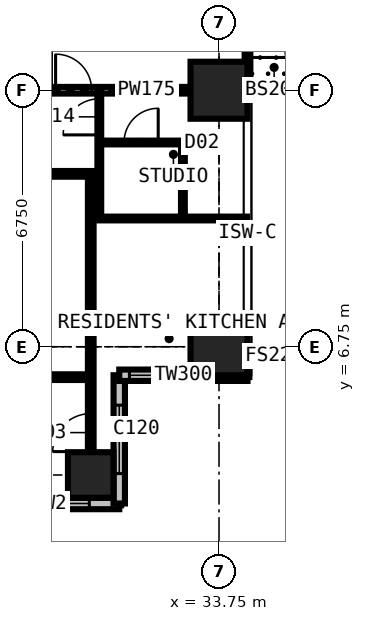
"""IFC4 building model, lengths in metres.
Left out: names, types, materials, properties, quantities, classifications, styles, units other than length and angle.
Written with IfcOpenShell. Run it as: python <this file> out.ifc"""

import sys

from ifc_helpers import new_model, si_unit, direction, frame, frame_2d, origin, origin_2d, place, context, subcontext, project, spatial, rectangle, extrude, element, fill, save


model = new_model("IFC4")
c1 = context("Model", 3, precision=1e-05, world=origin(), true_north=direction((0.0, 1.0)))
c2 = subcontext(c1, "Body", "Model", "MODEL_VIEW")
j1 = project(units=[si_unit("LENGTHUNIT", "METRE"), si_unit("PLANEANGLEUNIT", "RADIAN")], contexts=[c1])
p1 = place(None, origin())
s1 = spatial("IfcSite", under=j1, at=p1, CompositionType="ELEMENT")
p2 = place(p1, origin())
s2 = spatial("IfcBuilding", under=s1, at=p2, CompositionType="ELEMENT")
p3 = place(p2, frame((0.0, 0.0, 156.6)))
s3 = spatial("IfcBuildingStorey", under=s2, at=p3, CompositionType="ELEMENT", Elevation=156.6)
p4 = place(p3, frame((30.375, 3.375, 0.0), z_axis=(0.0, 0.0, 1.0), x_axis=(1.0, 0.0, 0.0)))
e1 = element("IfcColumn", 1, at=p4, inside=s3, PredefinedType="COLUMN", context=c2, shape_type="SweptSolid", body=[
    extrude(rectangle(XDim=1.2, YDim=1.2, at=origin_2d()), origin(), (0.0, 0.0, 1.0), 3.6),
])
for number, where, z_axis, x_axis in (
    (2, (33.75, 6.75, 0.0), (0.0, 0.0, 1.0), (1.0, 0.0, 0.0)),
    (3, (33.75, 13.5, 0.0), (0.0, 0.0, 1.0), (1.0, 0.0, 0.0)),
):
    element("IfcColumn", number, at=place(p3, frame(where, z_axis=z_axis, x_axis=x_axis)), inside=s3, PredefinedType="COLUMN", context=c2, shape_type="SweptSolid", body=[
        extrude(rectangle(XDim=1.5, YDim=1.5, at=origin_2d()), origin(), (0.0, 0.0, 1.0), 3.6),
    ])
p5 = place(p3, frame((34.5, 20.25, 0.0), z_axis=(0.0, 0.0, 1.0), x_axis=(0.0, -1.0, 0.0)))
e4 = element("IfcWall", 4, at=p5, inside=s3, PredefinedType="SOLIDWALL", context=c2, shape_type="SweptSolid", body=[
    extrude(rectangle(XDim=6.75, YDim=0.15, at=frame_2d((3.375, 0.0))), origin(), (0.0, 0.0, 1.0), 3.375),
])
p6 = place(p5, frame((0.863, 0.0, 0.0)))
e5 = element("IfcOpeningElement", 5, at=p6, cuts=e4, PredefinedType="OPENING", context=c2, shape_type="SweptSolid", body=[
    extrude(rectangle(XDim=1.0, YDim=2.2, at=frame_2d((0.5, 1.1))), frame((0.0, 0.085, 0.0), z_axis=(0.0, -1.0, 0.0), x_axis=(1.0, 0.0, 0.0)), (0.0, 0.0, 1.0), 0.17),
])
p7 = place(p5, frame((1.975, 0.0, 0.9)))
e6 = element("IfcOpeningElement", 6, at=p7, cuts=e4, PredefinedType="OPENING", context=c2, shape_type="SweptSolid", body=[
    extrude(rectangle(XDim=1.2, YDim=1.8, at=frame_2d((0.6, 0.9))), frame((0.0, 0.085, 0.0), z_axis=(0.0, -1.0, 0.0), x_axis=(1.0, 0.0, 0.0)), (0.0, 0.0, 1.0), 0.17),
])
p8 = place(p5, frame((4.887, 0.0, 0.0)))
e7 = element("IfcOpeningElement", 7, at=p8, cuts=e4, PredefinedType="OPENING", context=c2, shape_type="SweptSolid", body=[
    extrude(rectangle(XDim=1.0, YDim=2.2, at=frame_2d((0.5, 1.1))), frame((0.0, 0.085, 0.0), z_axis=(0.0, -1.0, 0.0), x_axis=(1.0, 0.0, 0.0)), (0.0, 0.0, 1.0), 0.17),
])
p9 = place(p5, frame((3.575, 0.0, 0.9)))
e8 = element("IfcOpeningElement", 8, at=p9, cuts=e4, PredefinedType="OPENING", context=c2, shape_type="SweptSolid", body=[
    extrude(rectangle(XDim=1.2, YDim=1.8, at=frame_2d((0.6, 0.9))), frame((0.0, 0.085, 0.0), z_axis=(0.0, -1.0, 0.0), x_axis=(1.0, 0.0, 0.0)), (0.0, 0.0, 1.0), 0.17),
])
p10 = place(p3, frame((27.75, 2.625, 0.0), z_axis=(0.0, 0.0, 1.0), x_axis=(1.0, 0.0, 0.0)))
e9 = element("IfcWall", 9, at=p10, inside=s3, PredefinedType="SOLIDWALL", context=c2, shape_type="SweptSolid", body=[
    extrude(rectangle(XDim=3.375, YDim=0.3, at=frame_2d((1.688, 0.0))), origin(), (0.0, 0.0, 1.0), 3.375),
])
p11 = place(p10, frame((0.788, 0.0, 0.6)))
e10 = element("IfcOpeningElement", 10, at=p11, cuts=e9, PredefinedType="OPENING", context=c2, shape_type="SweptSolid", body=[
    extrude(rectangle(XDim=1.8, YDim=2.1, at=frame_2d((0.9, 1.05))), frame((0.0, 0.16, 0.0), z_axis=(0.0, -1.0, 0.0), x_axis=(1.0, 0.0, 0.0)), (0.0, 0.0, 1.0), 0.32),
])
p12 = place(p3, frame((31.125, 2.625, 0.0), z_axis=(0.0, 0.0, 1.0), x_axis=(0.0, 1.0, 0.0)))
e11 = element("IfcWall", 11, at=p12, inside=s3, PredefinedType="SOLIDWALL", context=c2, shape_type="SweptSolid", body=[
    extrude(rectangle(XDim=3.375, YDim=0.3, at=frame_2d((1.688, 0.0))), origin(), (0.0, 0.0, 1.0), 3.375),
])
p13 = place(p12, frame((0.788, 0.0, 0.6)))
e12 = element("IfcOpeningElement", 12, at=p13, cuts=e11, PredefinedType="OPENING", context=c2, shape_type="SweptSolid", body=[
    extrude(rectangle(XDim=1.8, YDim=2.1, at=frame_2d((0.9, 1.05))), frame((0.0, 0.16, 0.0), z_axis=(0.0, -1.0, 0.0), x_axis=(1.0, 0.0, 0.0)), (0.0, 0.0, 1.0), 0.32),
])
p14 = place(p3, frame((31.125, 6.0, 0.0), z_axis=(0.0, 0.0, 1.0), x_axis=(1.0, 0.0, 0.0)))
e13 = element("IfcWall", 13, at=p14, inside=s3, PredefinedType="SOLIDWALL", context=c2, shape_type="SweptSolid", body=[
    extrude(rectangle(XDim=3.375, YDim=0.3, at=frame_2d((1.688, 0.0))), origin(), (0.0, 0.0, 1.0), 3.375),
])
p15 = place(p14, frame((0.268, 0.0, 0.9)))
e14 = element("IfcOpeningElement", 14, at=p15, cuts=e13, PredefinedType="OPENING", context=c2, shape_type="SweptSolid", body=[
    extrude(rectangle(XDim=1.5, YDim=1.8, at=frame_2d((0.75, 0.9))), frame((0.0, 0.16, 0.0), z_axis=(0.0, -1.0, 0.0), x_axis=(1.0, 0.0, 0.0)), (0.0, 0.0, 1.0), 0.32),
])
p16 = place(p3, frame((10.125, 11.3, 0.0), z_axis=(0.0, 0.0, 1.0), x_axis=(1.0, 0.0, 0.0)))
e15 = element("IfcWall", 15, at=p16, inside=s3, PredefinedType="PARTITIONING", context=c2, shape_type="SweptSolid", body=[
    extrude(rectangle(XDim=20.475, YDim=0.15, at=frame_2d((10.238, 0.0))), origin(), (0.0, 0.0, 1.0), 3.375),
])
p17 = place(p16, frame((11.312, 0.0, 0.0)))
e16 = element("IfcOpeningElement", 16, at=p17, cuts=e15, PredefinedType="OPENING", context=c2, shape_type="SweptSolid", body=[
    extrude(rectangle(XDim=1.0, YDim=2.2, at=frame_2d((0.5, 1.1))), frame((0.0, 0.085, 0.0), z_axis=(0.0, -1.0, 0.0), x_axis=(1.0, 0.0, 0.0)), (0.0, 0.0, 1.0), 0.17),
])
p18 = place(p3, frame((27.725, 5.95, 0.0), z_axis=(0.0, 0.0, 1.0), x_axis=(1.0, 0.0, 0.0)))
e17 = element("IfcWall", 17, at=p18, inside=s3, PredefinedType="PARTITIONING", context=c2, shape_type="SweptSolid", body=[
    extrude(rectangle(XDim=2.65, YDim=0.15, at=frame_2d((1.325, 0.0))), origin(), (0.0, 0.0, 1.0), 3.375),
])
p19 = place(p3, frame((29.2, 13.5, 0.0), z_axis=(0.0, 0.0, 1.0), x_axis=(1.0, 0.0, 0.0)))
e18 = element("IfcWall", 18, at=p19, inside=s3, PredefinedType="PARTITIONING", context=c2, shape_type="SweptSolid", body=[
    extrude(rectangle(XDim=5.284, YDim=0.175, at=frame_2d((2.642, 0.0))), origin(), (0.0, 0.0, 1.0), 2.806),
])
p20 = place(p19, frame((0.25, 0.0, 0.0)))
e19 = element("IfcOpeningElement", 19, at=p20, cuts=e18, PredefinedType="OPENING", context=c2, shape_type="SweptSolid", body=[
    extrude(rectangle(XDim=0.95, YDim=2.2, at=frame_2d((0.475, 1.1))), frame((0.0, 0.097, 0.0), z_axis=(0.0, -1.0, 0.0), x_axis=(1.0, 0.0, 0.0)), (0.0, 0.0, 1.0), 0.195),
])
p21 = place(p3, frame((30.375, 2.775, 0.0), z_axis=(0.0, 0.0, 1.0), x_axis=(0.0, 1.0, 0.0)))
e20 = element("IfcWall", 20, at=p21, inside=s3, PredefinedType="PARTITIONING", context=c2, shape_type="SweptSolid", body=[
    extrude(rectangle(XDim=8.525, YDim=0.15, at=frame_2d((4.263, 0.0))), origin(), (0.0, 0.0, 1.0), 2.877),
])
p22 = place(p21, frame((1.216, 0.0, 0.0)))
e21 = element("IfcOpeningElement", 21, at=p22, cuts=e20, PredefinedType="OPENING", context=c2, shape_type="SweptSolid", body=[
    extrude(rectangle(XDim=1.0, YDim=2.2, at=frame_2d((0.5, 1.1))), frame((0.0, 0.085, 0.0), z_axis=(0.0, -1.0, 0.0), x_axis=(1.0, 0.0, 0.0)), (0.0, 0.0, 1.0), 0.17),
])
p23 = place(p3, frame((30.6, 10.125, 0.0), z_axis=(0.0, 0.0, 1.0), x_axis=(0.0, 1.0, 0.0)))
e22 = element("IfcWall", 22, at=p23, inside=s3, PredefinedType="PARTITIONING", context=c2, shape_type="SweptSolid", body=[
    extrude(rectangle(XDim=3.375, YDim=0.1, at=frame_2d((1.688, 0.0))), origin(), (0.0, 0.0, 1.0), 3.375),
])
p24 = place(p23, frame((2.2, 0.0, 0.0)))
e23 = element("IfcOpeningElement", 23, at=p24, cuts=e22, PredefinedType="OPENING", context=c2, shape_type="SweptSolid", body=[
    extrude(rectangle(XDim=0.95, YDim=2.2, at=frame_2d((0.475, 1.1))), frame((0.0, 0.06, 0.0), z_axis=(0.0, -1.0, 0.0), x_axis=(1.0, 0.0, 0.0)), (0.0, 0.0, 1.0), 0.12),
])
p25 = place(p3, frame((30.6, 10.125, 0.0), z_axis=(0.0, 0.0, 1.0), x_axis=(1.0, 0.0, 0.0)))
e24 = element("IfcWall", 24, at=p25, inside=s3, PredefinedType="PARTITIONING", context=c2, shape_type="SweptSolid", body=[
    extrude(rectangle(XDim=3.884, YDim=0.1, at=frame_2d((1.942, 0.0))), origin(), (0.0, 0.0, 1.0), 3.375),
])
p26 = place(p3, frame((30.6, 12.125, 0.0), z_axis=(0.0, 0.0, 1.0), x_axis=(1.0, 0.0, 0.0)))
e25 = element("IfcWall", 25, at=p26, inside=s3, PredefinedType="PARTITIONING", context=c2, shape_type="SweptSolid", body=[
    extrude(rectangle(XDim=2.2, YDim=0.1, at=frame_2d((1.1, 0.0))), origin(), (0.0, 0.0, 1.0), 3.375),
])
p27 = place(p26, frame((0.65, 0.0, 0.0)))
e26 = element("IfcOpeningElement", 26, at=p27, cuts=e25, PredefinedType="OPENING", context=c2, shape_type="SweptSolid", body=[
    extrude(rectangle(XDim=0.9, YDim=2.2, at=frame_2d((0.45, 1.1))), frame((0.0, 0.06, 0.0), z_axis=(0.0, -1.0, 0.0), x_axis=(1.0, 0.0, 0.0)), (0.0, 0.0, 1.0), 0.12),
])
p28 = place(p3, frame((32.8, 10.125, 0.0), z_axis=(0.0, 0.0, 1.0), x_axis=(0.0, 1.0, 0.0)))
e27 = element("IfcWall", 27, at=p28, inside=s3, PredefinedType="PARTITIONING", context=c2, shape_type="SweptSolid", body=[
    extrude(rectangle(XDim=2.0, YDim=0.1, at=frame_2d((1.0, 0.0))), origin(), (0.0, 0.0, 1.0), 3.375),
])
p29 = place(p8, origin())
e28 = element("IfcDoor", 28, at=p29, inside=s3, OperationType="SINGLE_SWING_RIGHT", PredefinedType="DOOR", context=c2, shape_type="SweptSolid", body=[
    extrude(rectangle(XDim=1.0, YDim=2.2, at=frame_2d((0.5, 1.1))), frame((0.0, 0.025, 0.0), z_axis=(0.0, -1.0, 0.0), x_axis=(1.0, 0.0, 0.0)), (0.0, 0.0, 1.0), 0.05),
])
fill(e7, e28)
p30 = place(p11, origin())
e29 = element("IfcWindow", 29, at=p30, inside=s3, PartitioningType="SINGLE_PANEL", PredefinedType="WINDOW", context=c2, shape_type="SweptSolid", body=[
    extrude(rectangle(XDim=1.8, YDim=2.1, at=frame_2d((0.9, 1.05))), frame((0.0, 0.03, 0.0), z_axis=(0.0, -1.0, 0.0), x_axis=(1.0, 0.0, 0.0)), (0.0, 0.0, 1.0), 0.06),
])
fill(e10, e29)
p31 = place(p13, origin())
e30 = element("IfcWindow", 30, at=p31, inside=s3, PartitioningType="SINGLE_PANEL", PredefinedType="WINDOW", context=c2, shape_type="SweptSolid", body=[
    extrude(rectangle(XDim=1.8, YDim=2.1, at=frame_2d((0.9, 1.05))), frame((0.0, 0.03, 0.0), z_axis=(0.0, -1.0, 0.0), x_axis=(1.0, 0.0, 0.0)), (0.0, 0.0, 1.0), 0.06),
])
fill(e12, e30)
p32 = place(p15, origin())
e31 = element("IfcWindow", 31, at=p32, inside=s3, PartitioningType="SINGLE_PANEL", PredefinedType="WINDOW", context=c2, shape_type="SweptSolid", body=[
    extrude(rectangle(XDim=1.5, YDim=1.8, at=frame_2d((0.75, 0.9))), frame((0.0, 0.03, 0.0), z_axis=(0.0, -1.0, 0.0), x_axis=(1.0, 0.0, 0.0)), (0.0, 0.0, 1.0), 0.06),
])
fill(e14, e31)
p33 = place(p22, origin())
e32 = element("IfcDoor", 32, at=p33, inside=s3, OperationType="SINGLE_SWING_LEFT", PredefinedType="DOOR", context=c2, shape_type="SweptSolid", body=[
    extrude(rectangle(XDim=1.0, YDim=2.2, at=frame_2d((0.5, 1.1))), frame((0.0, 0.025, 0.0), z_axis=(0.0, -1.0, 0.0), x_axis=(1.0, 0.0, 0.0)), (0.0, 0.0, 1.0), 0.05),
])
fill(e21, e32)
p34 = place(p24, origin())
e33 = element("IfcDoor", 33, at=p34, inside=s3, OperationType="SINGLE_SWING_LEFT", PredefinedType="DOOR", context=c2, shape_type="SweptSolid", body=[
    extrude(rectangle(XDim=0.95, YDim=2.2, at=frame_2d((0.475, 1.1))), frame((0.0, 0.025, 0.0), z_axis=(0.0, -1.0, 0.0), x_axis=(1.0, 0.0, 0.0)), (0.0, 0.0, 1.0), 0.05),
])
fill(e23, e33)
p35 = place(p27, origin())
e34 = element("IfcDoor", 34, at=p35, inside=s3, OperationType="SINGLE_SWING_RIGHT", PredefinedType="DOOR", context=c2, shape_type="SweptSolid", body=[
    extrude(rectangle(XDim=0.9, YDim=2.2, at=frame_2d((0.45, 1.1))), frame((0.0, 0.025, 0.0), z_axis=(0.0, -1.0, 0.0), x_axis=(1.0, 0.0, 0.0)), (0.0, 0.0, 1.0), 0.05),
])
fill(e26, e34)
p36 = place(p20, origin())
e35 = element("IfcDoor", 35, at=p36, inside=s3, OperationType="SINGLE_SWING_LEFT", PredefinedType="DOOR", context=c2, shape_type="SweptSolid", body=[
    extrude(rectangle(XDim=0.95, YDim=2.2, at=frame_2d((0.475, 1.1))), frame((0.0, 0.025, 0.0), z_axis=(0.0, -1.0, 0.0), x_axis=(1.0, 0.0, 0.0)), (0.0, 0.0, 1.0), 0.05),
])
fill(e19, e35)
save(model, sys.argv[1])
